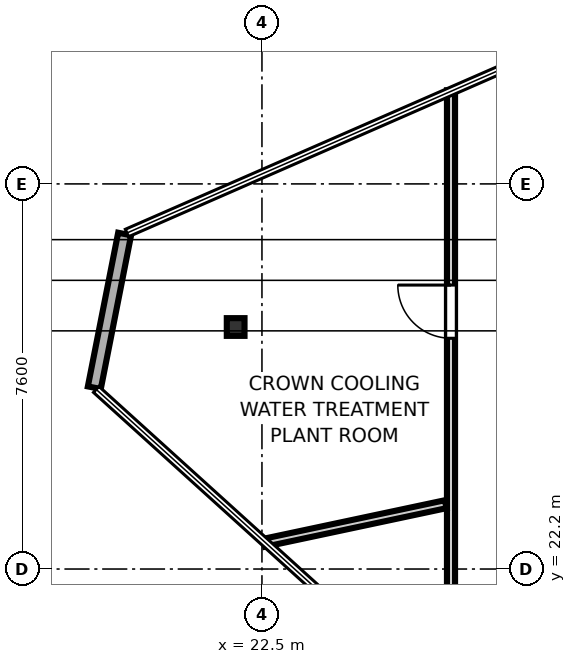
"""IFC4 building model, lengths in metres.
Left out: names, types, materials, properties, quantities, classifications, styles, units other than length and angle.
Written with IfcOpenShell. Run it as: python <this file> out.ifc"""

import sys

from ifc_helpers import new_model, si_unit, direction, frame, frame_2d, origin, origin_2d, place, context, subcontext, project, spatial, rectangle, i_section, extrude, element, fill, save


model = new_model("IFC4")
c1 = context("Model", 3, precision=1e-05, world=origin(), true_north=direction((0.0, 1.0)))
c2 = subcontext(c1, "Body", "Model", "MODEL_VIEW")
j1 = project(units=[si_unit("LENGTHUNIT", "METRE"), si_unit("PLANEANGLEUNIT", "RADIAN")], contexts=[c1])
p1 = place(None, origin())
s1 = spatial("IfcSite", under=j1, at=p1, CompositionType="ELEMENT")
p2 = place(p1, origin())
s2 = spatial("IfcBuilding", under=s1, at=p2, CompositionType="ELEMENT")
p3 = place(p2, frame((0.0, 0.0, 363.8)))
s3 = spatial("IfcBuildingStorey", under=s2, at=p3, CompositionType="ELEMENT", Elevation=363.8)
p4 = place(p3, frame((21.981, 26.976, 0.0), z_axis=(0.0, 0.0, 1.0), x_axis=(1.0, 0.0, 0.0)))
e1 = element("IfcColumn", 1, at=p4, inside=s3, PredefinedType="COLUMN", context=c2, shape_type="SweptSolid", body=[
    extrude(i_section(OverallWidth=0.35, OverallDepth=0.35, WebThickness=0.012, FlangeThickness=0.019, at=origin_2d()), origin(), (0.0, 0.0, 1.0), 3.75),
])
p5 = place(p3, frame((19.79, 28.811, 0.0), z_axis=(0.0, 0.0, 1.0), x_axis=(-0.193411983947, -0.98111763029, 0.0)))
e2 = element("IfcWall", 2, at=p5, inside=s3, PredefinedType="SOLIDWALL", context=c2, shape_type="SweptSolid", body=[
    extrude(rectangle(XDim=3.091, YDim=0.26, at=frame_2d((1.546, 0.0))), origin(), (0.0, 0.0, 1.0), 3.55),
])
p6 = place(p3, frame((26.231, 19.385, 0.0), z_axis=(0.0, 0.0, 1.0), x_axis=(0.0, 1.0, 0.0)))
e3 = element("IfcWall", 3, at=p6, inside=s3, PredefinedType="PARTITIONING", context=c2, shape_type="SweptSolid", body=[
    extrude(rectangle(XDim=12.263, YDim=0.16, at=frame_2d((6.132, 0.0))), origin(), (0.0, 0.0, 1.0), 2.87),
])
p7 = place(p6, frame((7.369, 0.0, 0.0)))
e4 = element("IfcOpeningElement", 4, at=p7, cuts=e3, PredefinedType="OPENING", context=c2, shape_type="SweptSolid", body=[
    extrude(rectangle(XDim=1.05, YDim=2.15, at=frame_2d((0.525, 1.075))), frame((0.0, 0.09, 0.0), z_axis=(0.0, -1.0, 0.0), x_axis=(1.0, 0.0, 0.0)), (0.0, 0.0, 1.0), 0.18),
])
p8 = place(p3, frame((22.547, 22.719, 0.0), z_axis=(0.0, 0.0, 1.0), x_axis=(0.978151559121, 0.2078930672, 0.0)))
e5 = element("IfcWall", 5, at=p8, inside=s3, PredefinedType="PARTITIONING", context=c2, shape_type="SweptSolid", body=[
    extrude(rectangle(XDim=3.659, YDim=0.16, at=frame_2d((1.83, 0.0))), origin(), (0.0, 0.0, 1.0), 2.87),
])
p9 = place(p7, origin())
e6 = element("IfcDoor", 6, at=p9, inside=s3, OperationType="SINGLE_SWING_RIGHT", PredefinedType="DOOR", context=c2, shape_type="SweptSolid", body=[
    extrude(rectangle(XDim=1.05, YDim=2.15, at=frame_2d((0.525, 1.075))), frame((0.0, 0.025, 0.0), z_axis=(0.0, -1.0, 0.0), x_axis=(1.0, 0.0, 0.0)), (0.0, 0.0, 1.0), 0.05),
])
fill(e4, e6)
save(model, sys.argv[1])
